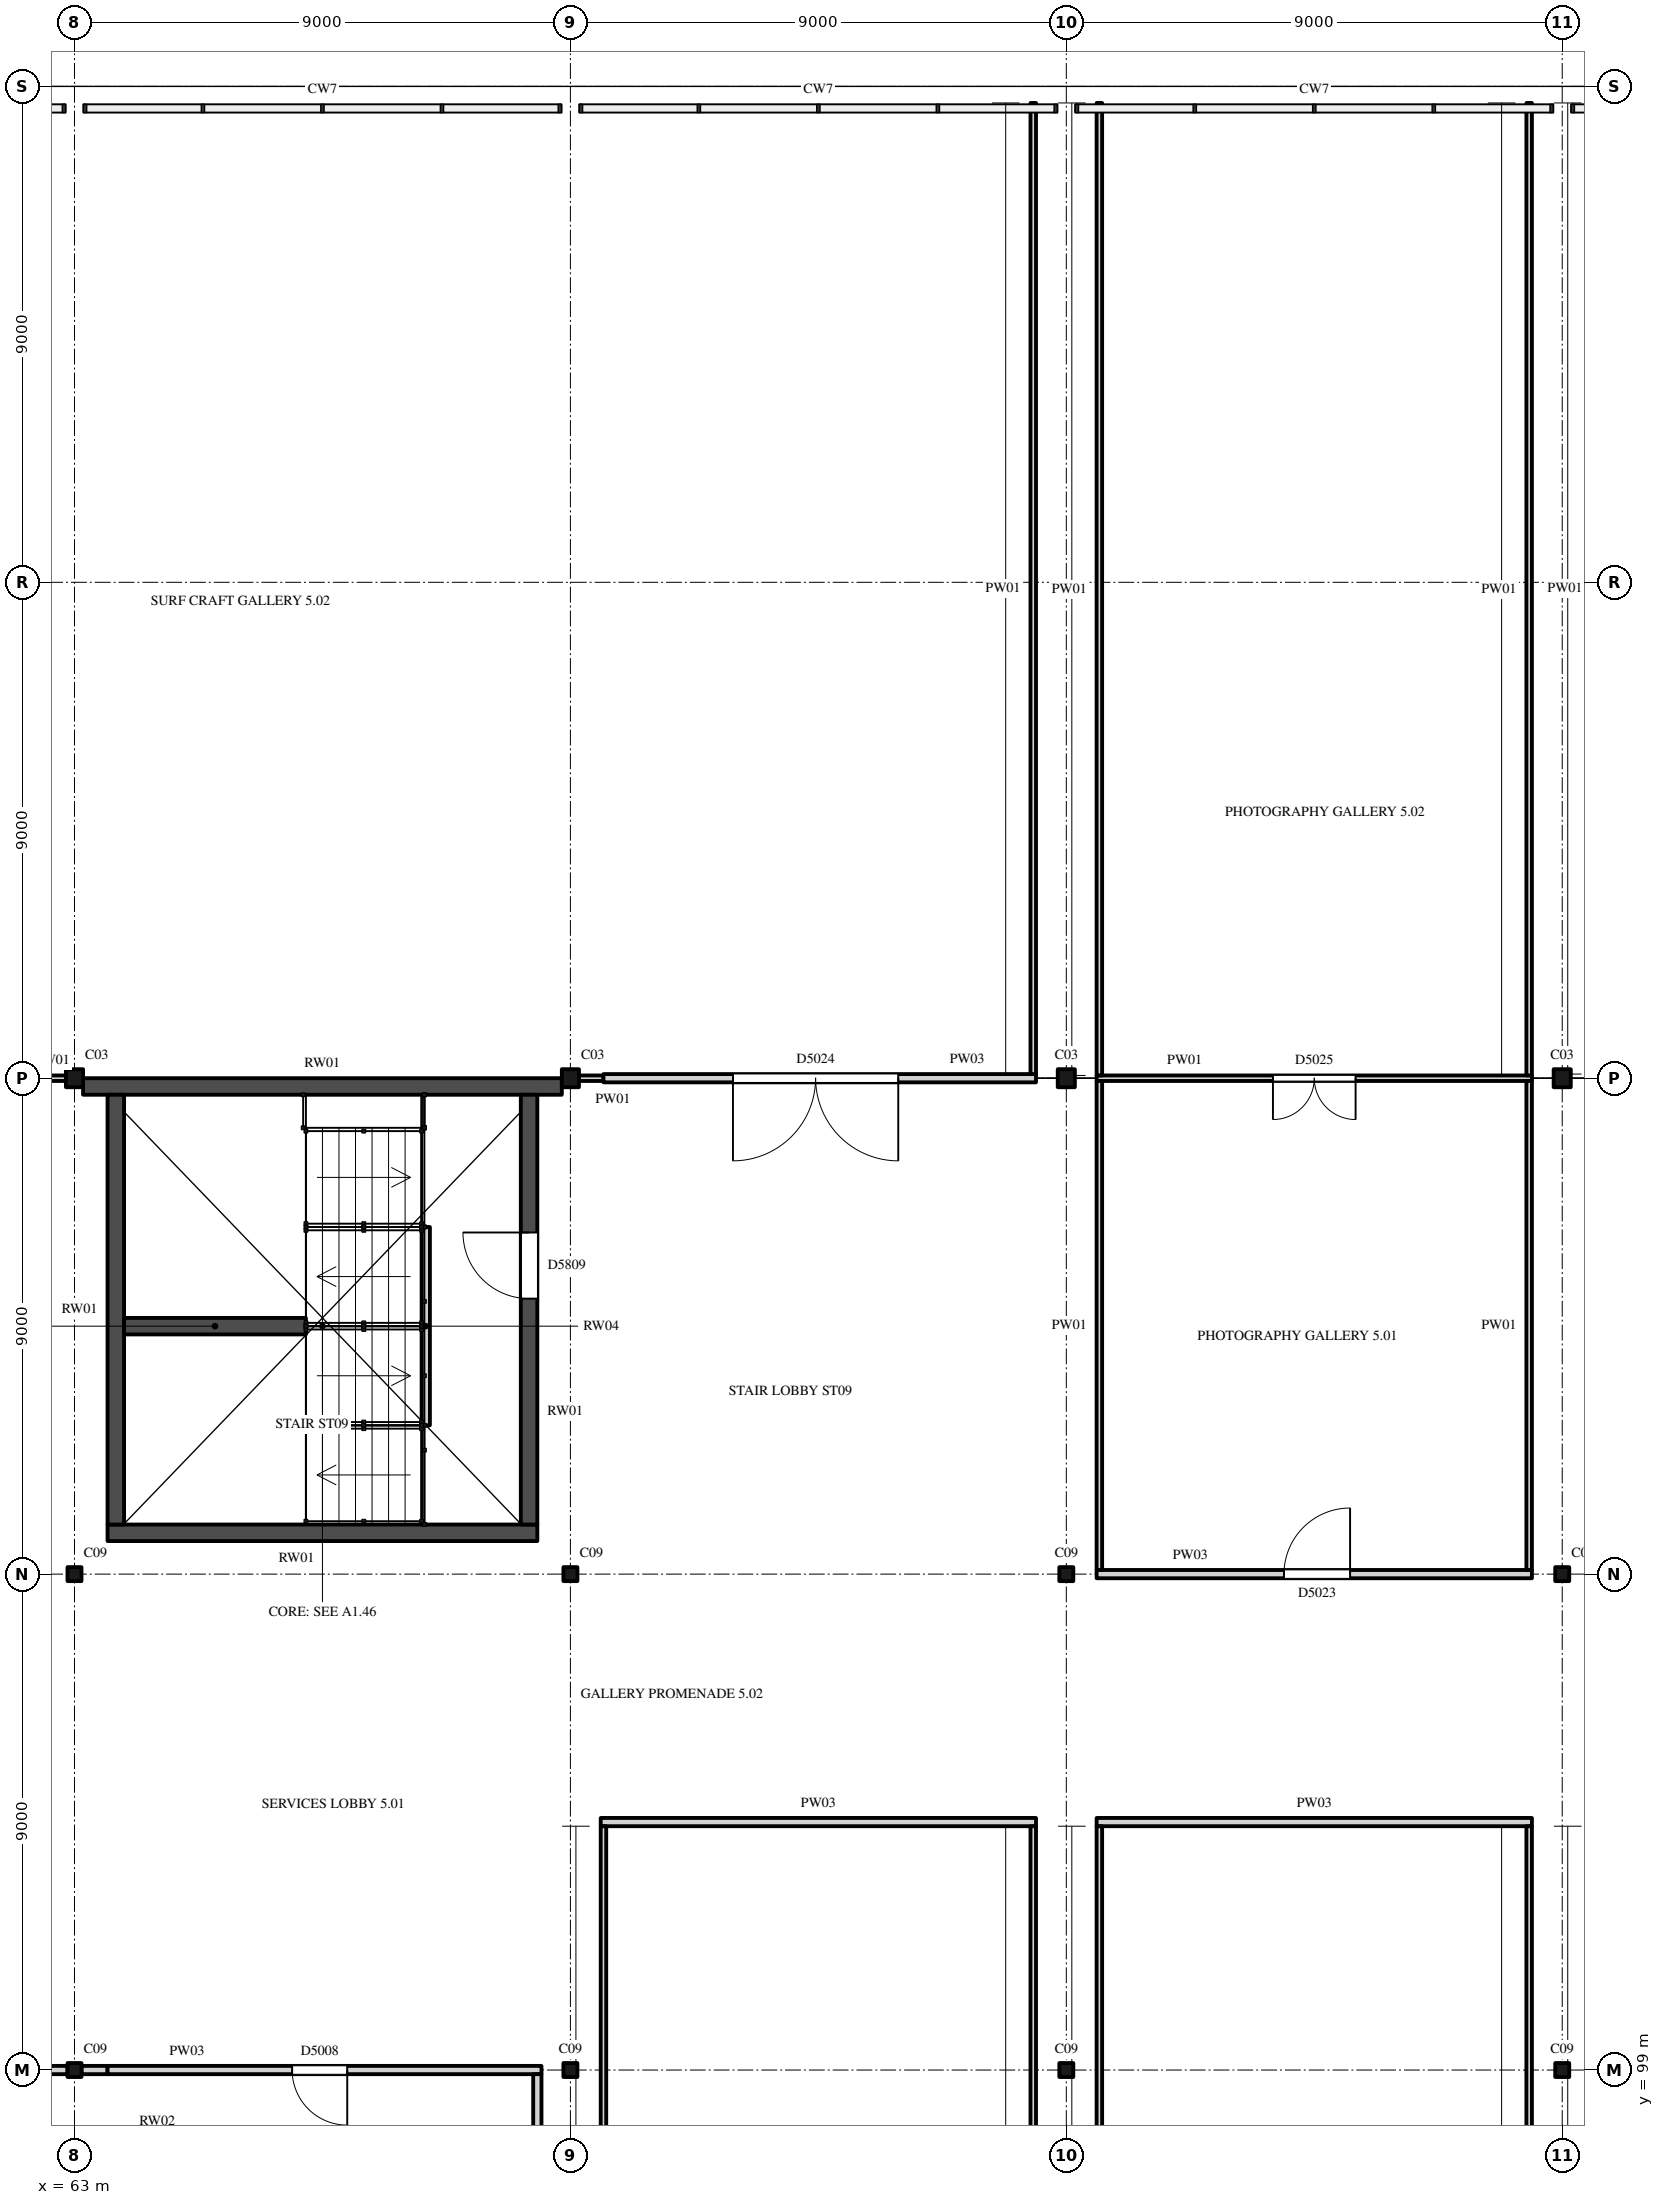
"""IFC4 building model, lengths in metres.
Left out: names, types, materials, properties, quantities, classifications, styles, units other than length and angle.
Written with IfcOpenShell. Run it as: python <this file> out.ifc"""

import sys

from ifc_helpers import new_model, si_unit, direction, frame, frame_2d, origin, origin_2d, place, context, subcontext, project, spatial, rectangle, i_section, extrude, element, fill, save


model = new_model("IFC4")
c1 = context("Model", 3, precision=1e-05, world=origin(), true_north=direction((0.0, 1.0)))
c2 = subcontext(c1, "Body", "Model", "MODEL_VIEW")
j1 = project(units=[si_unit("LENGTHUNIT", "METRE"), si_unit("PLANEANGLEUNIT", "RADIAN")], contexts=[c1])
p1 = place(None, origin())
s1 = spatial("IfcSite", under=j1, at=p1, CompositionType="ELEMENT")
p2 = place(p1, origin())
s2 = spatial("IfcBuilding", under=s1, at=p2, CompositionType="ELEMENT")
p3 = place(p2, frame((0.0, 0.0, 31.0)))
s3 = spatial("IfcBuildingStorey", under=s2, at=p3, CompositionType="ELEMENT", Elevation=31.0)
for number, where, z_axis, x_axis in (
    (1, (63.0, 99.0, 0.0), (0.0, 0.0, 1.0), (1.0, 0.0, 0.0)),
    (2, (72.0, 99.0, 0.0), (0.0, 0.0, 1.0), (1.0, 0.0, 0.0)),
    (3, (81.0, 99.0, 0.0), (0.0, 0.0, 1.0), (1.0, 0.0, 0.0)),
    (4, (90.0, 99.0, 0.0), (0.0, 0.0, 1.0), (1.0, 0.0, 0.0)),
    (5, (63.0, 108.0, 0.0), (0.0, 0.0, 1.0), (1.0, 0.0, 0.0)),
    (6, (72.0, 108.0, 0.0), (0.0, 0.0, 1.0), (1.0, 0.0, 0.0)),
    (7, (81.0, 108.0, 0.0), (0.0, 0.0, 1.0), (1.0, 0.0, 0.0)),
    (8, (90.0, 108.0, 0.0), (0.0, 0.0, 1.0), (1.0, 0.0, 0.0)),
):
    element("IfcColumn", number, at=place(p3, frame(where, z_axis=z_axis, x_axis=x_axis)), inside=s3, PredefinedType="COLUMN", context=c2, shape_type="SweptSolid", body=[
        extrude(i_section(OverallWidth=0.254, OverallDepth=0.254, WebThickness=0.009, FlangeThickness=0.014, FilletRadius=0.014, at=origin_2d()), origin(), (0.0, 0.0, 1.0), 5.0),
    ])
for number, where, z_axis, x_axis in (
    (9, (63.0, 117.0, 0.0), (0.0, 0.0, 1.0), (1.0, 0.0, 0.0)),
    (10, (72.0, 117.0, 0.0), (0.0, 0.0, 1.0), (1.0, 0.0, 0.0)),
    (11, (81.0, 117.0, 0.0), (0.0, 0.0, 1.0), (1.0, 0.0, 0.0)),
    (12, (90.0, 117.0, 0.0), (0.0, 0.0, 1.0), (1.0, 0.0, 0.0)),
):
    element("IfcColumn", number, at=place(p3, frame(where, z_axis=z_axis, x_axis=x_axis)), inside=s3, PredefinedType="COLUMN", context=c2, shape_type="SweptSolid", body=[
        extrude(i_section(OverallWidth=0.311, OverallDepth=0.327, WebThickness=0.016, FlangeThickness=0.025, FilletRadius=0.017, at=origin_2d()), origin(), (0.0, 0.0, 1.0), 5.0),
    ])
p4 = place(p3, frame((63.6, 108.75, 0.0), z_axis=(0.0, 0.0, 1.0), x_axis=(1.0, 0.0, 0.0)))
e13 = element("IfcWall", 13, at=p4, inside=s3, PredefinedType="SHEAR", context=c2, shape_type="SweptSolid", body=[
    extrude(rectangle(XDim=7.8, YDim=0.3, at=frame_2d((3.9, 0.0))), origin(), (0.0, 0.0, 1.0), 5.0),
])
p5 = place(p3, frame((63.156, 116.85, 0.0), z_axis=(0.0, 0.0, 1.0), x_axis=(1.0, 0.0, 0.0)))
e14 = element("IfcWall", 14, at=p5, inside=s3, PredefinedType="SHEAR", context=c2, shape_type="SweptSolid", body=[
    extrude(rectangle(XDim=8.689, YDim=0.3, at=frame_2d((4.344, 0.0))), origin(), (0.0, 0.0, 1.0), 5.0),
])
p6 = place(p3, frame((63.75, 108.9, 0.0), z_axis=(0.0, 0.0, 1.0), x_axis=(0.0, 1.0, 0.0)))
e15 = element("IfcWall", 15, at=p6, inside=s3, PredefinedType="SHEAR", context=c2, shape_type="SweptSolid", body=[
    extrude(rectangle(XDim=7.8, YDim=0.3, at=frame_2d((3.9, 0.0))), origin(), (0.0, 0.0, 1.0), 5.0),
])
p7 = place(p3, frame((71.25, 108.9, 0.0), z_axis=(0.0, 0.0, 1.0), x_axis=(0.0, 1.0, 0.0)))
e16 = element("IfcWall", 16, at=p7, inside=s3, PredefinedType="SHEAR", context=c2, shape_type="SweptSolid", body=[
    extrude(rectangle(XDim=7.8, YDim=0.3, at=frame_2d((3.9, 0.0))), origin(), (0.0, 0.0, 1.0), 5.0),
])
p8 = place(p7, frame((4.1, 0.0, 0.0)))
e17 = element("IfcOpeningElement", 17, at=p8, cuts=e16, PredefinedType="OPENING", context=c2, shape_type="SweptSolid", body=[
    extrude(rectangle(XDim=1.2, YDim=2.1, at=frame_2d((0.6, 1.05))), frame((0.0, 0.16, 0.0), z_axis=(0.0, -1.0, 0.0), x_axis=(1.0, 0.0, 0.0)), (0.0, 0.0, 1.0), 0.32),
])
p9 = place(p3, frame((67.2, 112.5, 0.0), z_axis=(0.0, 0.0, 1.0), x_axis=(-1.0, 0.0, 0.0)))
e18 = element("IfcWall", 18, at=p9, inside=s3, PredefinedType="SHEAR", context=c2, shape_type="SweptSolid", body=[
    extrude(rectangle(XDim=3.3, YDim=0.3, at=frame_2d((1.65, 0.0))), origin(), (0.0, 0.0, 1.0), 5.0),
])
p10 = place(p3, frame((69.375, 110.7, 0.0), z_axis=(0.0, 0.0, 1.0), x_axis=(0.0, 1.0, 0.0)))
e19 = element("IfcWall", 19, at=p10, inside=s3, PredefinedType="STANDARD", context=c2, shape_type="SweptSolid", body=[
    extrude(rectangle(XDim=3.6, YDim=0.15, at=frame_2d((1.8, 0.0))), origin(), (0.0, 0.0, 1.0), 2.3),
])
p11 = place(p3, frame((62.338, 99.0, 0.0), z_axis=(0.0, 0.0, 1.0), x_axis=(1.0, 0.0, 0.0)))
e20 = element("IfcWall", 20, at=p11, inside=s3, PredefinedType="PARTITIONING", context=c2, shape_type="SweptSolid", body=[
    extrude(rectangle(XDim=0.535, YDim=0.15, at=frame_2d((0.268, 0.0))), origin(), (0.0, 0.0, 1.0), 4.518),
])
p12 = place(p3, frame((63.127, 99.0, 0.0), z_axis=(0.0, 0.0, 1.0), x_axis=(1.0, 0.0, 0.0)))
e21 = element("IfcWall", 21, at=p12, inside=s3, PredefinedType="PARTITIONING", context=c2, shape_type="SweptSolid", body=[
    extrude(rectangle(XDim=0.473, YDim=0.15, at=frame_2d((0.236, 0.0))), origin(), (0.0, 0.0, 1.0), 4.825),
])
p13 = place(p3, frame((63.6, 99.0, 0.0), z_axis=(0.0, 0.0, 1.0), x_axis=(1.0, 0.0, 0.0)))
e22 = element("IfcWall", 22, at=p13, inside=s3, PredefinedType="PARTITIONING", context=c2, shape_type="SweptSolid", body=[
    extrude(rectangle(XDim=7.875, YDim=0.15, at=frame_2d((3.938, 0.0))), origin(), (0.0, 0.0, 1.0), 4.518),
])
p14 = place(p13, frame((3.35, 0.0, 0.0)))
e23 = element("IfcOpeningElement", 23, at=p14, cuts=e22, PredefinedType="OPENING", context=c2, shape_type="SweptSolid", body=[
    extrude(rectangle(XDim=1.0, YDim=2.4, at=frame_2d((0.5, 1.2))), frame((0.0, 0.085, 0.0), z_axis=(0.0, -1.0, 0.0), x_axis=(1.0, 0.0, 0.0)), (0.0, 0.0, 1.0), 0.17),
])
for number, where, z_axis, x_axis in (
    (24, (72.55, 103.5, 0.0), (0.0, 0.0, 1.0), (1.0, 0.0, 0.0)),
    (25, (81.55, 103.5, 0.0), (0.0, 0.0, 1.0), (1.0, 0.0, 0.0)),
):
    element("IfcWall", number, at=place(p3, frame(where, z_axis=z_axis, x_axis=x_axis)), inside=s3, PredefinedType="PARTITIONING", context=c2, shape_type="SweptSolid", body=[
        extrude(rectangle(XDim=7.9, YDim=0.15, at=frame_2d((3.95, 0.0))), origin(), (0.0, 0.0, 1.0), 4.825),
    ])
p15 = place(p3, frame((81.55, 108.0, 0.0), z_axis=(0.0, 0.0, 1.0), x_axis=(1.0, 0.0, 0.0)))
e26 = element("IfcWall", 26, at=p15, inside=s3, PredefinedType="PARTITIONING", context=c2, shape_type="SweptSolid", body=[
    extrude(rectangle(XDim=7.9, YDim=0.15, at=frame_2d((3.95, 0.0))), origin(), (0.0, 0.0, 1.0), 4.518),
])
p16 = place(p15, frame((3.4, 0.0, 0.0)))
e27 = element("IfcOpeningElement", 27, at=p16, cuts=e26, PredefinedType="OPENING", context=c2, shape_type="SweptSolid", body=[
    extrude(rectangle(XDim=1.2, YDim=2.4, at=frame_2d((0.6, 1.2))), frame((0.0, 0.085, 0.0), z_axis=(0.0, -1.0, 0.0), x_axis=(1.0, 0.0, 0.0)), (0.0, 0.0, 1.0), 0.17),
])
p17 = place(p3, frame((62.351, 117.0, 0.0), z_axis=(0.0, 0.0, 1.0), x_axis=(1.0, 0.0, 0.0)))
e28 = element("IfcWall", 28, at=p17, inside=s3, PredefinedType="PARTITIONING", context=c2, shape_type="SweptSolid", body=[
    extrude(rectangle(XDim=0.494, YDim=0.1, at=frame_2d((0.247, 0.0))), origin(), (0.0, 0.0, 1.0), 4.825),
])
p18 = place(p3, frame((72.156, 117.0, 0.0), z_axis=(0.0, 0.0, 1.0), x_axis=(1.0, 0.0, 0.0)))
e29 = element("IfcWall", 29, at=p18, inside=s3, PredefinedType="PARTITIONING", context=c2, shape_type="SweptSolid", body=[
    extrude(rectangle(XDim=0.444, YDim=0.1, at=frame_2d((0.222, 0.0))), origin(), (0.0, 0.0, 1.0), 4.825),
])
p19 = place(p3, frame((72.6, 117.0, 0.0), z_axis=(0.0, 0.0, 1.0), x_axis=(1.0, 0.0, 0.0)))
e30 = element("IfcWall", 30, at=p19, inside=s3, PredefinedType="PARTITIONING", context=c2, shape_type="SweptSolid", body=[
    extrude(rectangle(XDim=7.85, YDim=0.15, at=frame_2d((3.925, 0.0))), origin(), (0.0, 0.0, 1.0), 4.518),
])
p20 = place(p19, frame((2.35, 0.0, 0.0)))
e31 = element("IfcOpeningElement", 31, at=p20, cuts=e30, PredefinedType="OPENING", context=c2, shape_type="SweptSolid", body=[
    extrude(rectangle(XDim=3.0, YDim=3.0, at=frame_2d((1.5, 1.5))), frame((0.0, 0.085, 0.0), z_axis=(0.0, -1.0, 0.0), x_axis=(1.0, 0.0, 0.0)), (0.0, 0.0, 1.0), 0.17),
])
p21 = place(p3, frame((81.55, 117.0, 0.0), z_axis=(0.0, 0.0, 1.0), x_axis=(1.0, 0.0, 0.0)))
e32 = element("IfcWall", 32, at=p21, inside=s3, PredefinedType="PARTITIONING", context=c2, shape_type="SweptSolid", body=[
    extrude(rectangle(XDim=7.9, YDim=0.1, at=frame_2d((3.95, 0.0))), origin(), (0.0, 0.0, 1.0), 4.518),
])
p22 = place(p21, frame((3.2, 0.0, 0.0)))
e33 = element("IfcOpeningElement", 33, at=p22, cuts=e32, PredefinedType="OPENING", context=c2, shape_type="SweptSolid", body=[
    extrude(rectangle(XDim=1.5, YDim=2.4, at=frame_2d((0.75, 1.2))), frame((0.0, 0.06, 0.0), z_axis=(0.0, -1.0, 0.0), x_axis=(1.0, 0.0, 0.0)), (0.0, 0.0, 1.0), 0.12),
])
p23 = place(p3, frame((71.4, 94.25, 0.0), z_axis=(0.0, 0.0, 1.0), x_axis=(0.0, 1.0, 0.0)))
e34 = element("IfcWall", 34, at=p23, inside=s3, PredefinedType="PARTITIONING", context=c2, shape_type="SweptSolid", body=[
    extrude(rectangle(XDim=4.675, YDim=0.15, at=frame_2d((2.337, 0.0))), origin(), (0.0, 0.0, 1.0), 4.825),
])
for number, where, z_axis, x_axis in (
    (35, (72.6, 90.675, 0.0), (0.0, 0.0, 1.0), (0.0, 1.0, 0.0)),
    (36, (80.4, 90.675, 0.0), (0.0, 0.0, 1.0), (0.0, 1.0, 0.0)),
):
    element("IfcWall", number, at=place(p3, frame(where, z_axis=z_axis, x_axis=x_axis)), inside=s3, PredefinedType="PARTITIONING", context=c2, shape_type="SweptSolid", body=[
        extrude(rectangle(XDim=12.75, YDim=0.1, at=frame_2d((6.375, 0.0))), origin(), (0.0, 0.0, 1.0), 4.825),
    ])
p24 = place(p3, frame((80.4, 117.075, 0.0), z_axis=(0.0, 0.0, 1.0), x_axis=(0.0, 1.0, 0.0)))
e37 = element("IfcWall", 37, at=p24, inside=s3, PredefinedType="PARTITIONING", context=c2, shape_type="SweptSolid", body=[
    extrude(rectangle(XDim=17.625, YDim=0.1, at=frame_2d((8.812, 0.0))), origin(), (0.0, 0.0, 1.0), 4.825),
])
p25 = place(p3, frame((81.6, 90.675, 0.0), z_axis=(0.0, 0.0, 1.0), x_axis=(0.0, 1.0, 0.0)))
e38 = element("IfcWall", 38, at=p25, inside=s3, PredefinedType="PARTITIONING", context=c2, shape_type="SweptSolid", body=[
    extrude(rectangle(XDim=12.75, YDim=0.1, at=frame_2d((6.375, 0.0))), origin(), (0.0, 0.0, 1.0), 4.825),
])
p26 = place(p3, frame((81.6, 108.075, 0.0), z_axis=(0.0, 0.0, 1.0), x_axis=(0.0, 1.0, 0.0)))
e39 = element("IfcWall", 39, at=p26, inside=s3, PredefinedType="PARTITIONING", context=c2, shape_type="SweptSolid", body=[
    extrude(rectangle(XDim=8.875, YDim=0.1, at=frame_2d((4.438, 0.0))), origin(), (0.0, 0.0, 1.0), 4.825),
])
p27 = place(p3, frame((81.6, 117.05, 0.0), z_axis=(0.0, 0.0, 1.0), x_axis=(0.0, 1.0, 0.0)))
e40 = element("IfcWall", 40, at=p27, inside=s3, PredefinedType="PARTITIONING", context=c2, shape_type="SweptSolid", body=[
    extrude(rectangle(XDim=17.649, YDim=0.1, at=frame_2d((8.825, 0.0))), origin(), (0.0, 0.0, 1.0), 4.825),
])
p28 = place(p3, frame((89.4, 90.675, 0.0), z_axis=(0.0, 0.0, 1.0), x_axis=(0.0, 1.0, 0.0)))
e41 = element("IfcWall", 41, at=p28, inside=s3, PredefinedType="PARTITIONING", context=c2, shape_type="SweptSolid", body=[
    extrude(rectangle(XDim=12.75, YDim=0.1, at=frame_2d((6.375, 0.0))), origin(), (0.0, 0.0, 1.0), 4.825),
])
p29 = place(p3, frame((89.4, 108.075, 0.0), z_axis=(0.0, 0.0, 1.0), x_axis=(0.0, 1.0, 0.0)))
e42 = element("IfcWall", 42, at=p29, inside=s3, PredefinedType="PARTITIONING", context=c2, shape_type="SweptSolid", body=[
    extrude(rectangle(XDim=8.875, YDim=0.1, at=frame_2d((4.438, 0.0))), origin(), (0.0, 0.0, 1.0), 4.825),
])
p30 = place(p3, frame((89.4, 117.05, 0.0), z_axis=(0.0, 0.0, 1.0), x_axis=(0.0, 1.0, 0.0)))
e43 = element("IfcWall", 43, at=p30, inside=s3, PredefinedType="PARTITIONING", context=c2, shape_type="SweptSolid", body=[
    extrude(rectangle(XDim=17.649, YDim=0.1, at=frame_2d((8.825, 0.0))), origin(), (0.0, 0.0, 1.0), 4.825),
])
p31 = place(p8, origin())
e44 = element("IfcDoor", 44, at=p31, inside=s3, OperationType="SINGLE_SWING_LEFT", PredefinedType="DOOR", context=c2, shape_type="SweptSolid", body=[
    extrude(rectangle(XDim=1.2, YDim=2.1, at=frame_2d((0.6, 1.05))), frame((0.0, 0.025, 0.0), z_axis=(0.0, -1.0, 0.0), x_axis=(1.0, 0.0, 0.0)), (0.0, 0.0, 1.0), 0.05),
])
fill(e17, e44)
p32 = place(p14, origin())
e45 = element("IfcDoor", 45, at=p32, inside=s3, OperationType="SINGLE_SWING_RIGHT", PredefinedType="DOOR", context=c2, shape_type="SweptSolid", body=[
    extrude(rectangle(XDim=1.0, YDim=2.4, at=frame_2d((0.5, 1.2))), frame((0.0, 0.025, 0.0), z_axis=(0.0, -1.0, 0.0), x_axis=(1.0, 0.0, 0.0)), (0.0, 0.0, 1.0), 0.05),
])
fill(e23, e45)
p33 = place(p16, origin())
e46 = element("IfcDoor", 46, at=p33, inside=s3, OperationType="SINGLE_SWING_LEFT", PredefinedType="DOOR", context=c2, shape_type="SweptSolid", body=[
    extrude(rectangle(XDim=1.2, YDim=2.4, at=frame_2d((0.6, 1.2))), frame((0.0, 0.025, 0.0), z_axis=(0.0, -1.0, 0.0), x_axis=(1.0, 0.0, 0.0)), (0.0, 0.0, 1.0), 0.05),
])
fill(e27, e46)
p34 = place(p20, origin())
e47 = element("IfcDoor", 47, at=p34, inside=s3, OperationType="DOUBLE_DOOR_SINGLE_SWING", PredefinedType="DOOR", context=c2, shape_type="SweptSolid", body=[
    extrude(rectangle(XDim=3.0, YDim=3.0, at=frame_2d((1.5, 1.5))), frame((0.0, 0.025, 0.0), z_axis=(0.0, -1.0, 0.0), x_axis=(1.0, 0.0, 0.0)), (0.0, 0.0, 1.0), 0.05),
])
fill(e31, e47)
p35 = place(p22, origin())
e48 = element("IfcDoor", 48, at=p35, inside=s3, OperationType="DOUBLE_DOOR_SINGLE_SWING", PredefinedType="DOOR", context=c2, shape_type="SweptSolid", body=[
    extrude(rectangle(XDim=1.5, YDim=2.4, at=frame_2d((0.75, 1.2))), frame((0.0, 0.025, 0.0), z_axis=(0.0, -1.0, 0.0), x_axis=(1.0, 0.0, 0.0)), (0.0, 0.0, 1.0), 0.05),
])
fill(e33, e48)
save(model, sys.argv[1])
